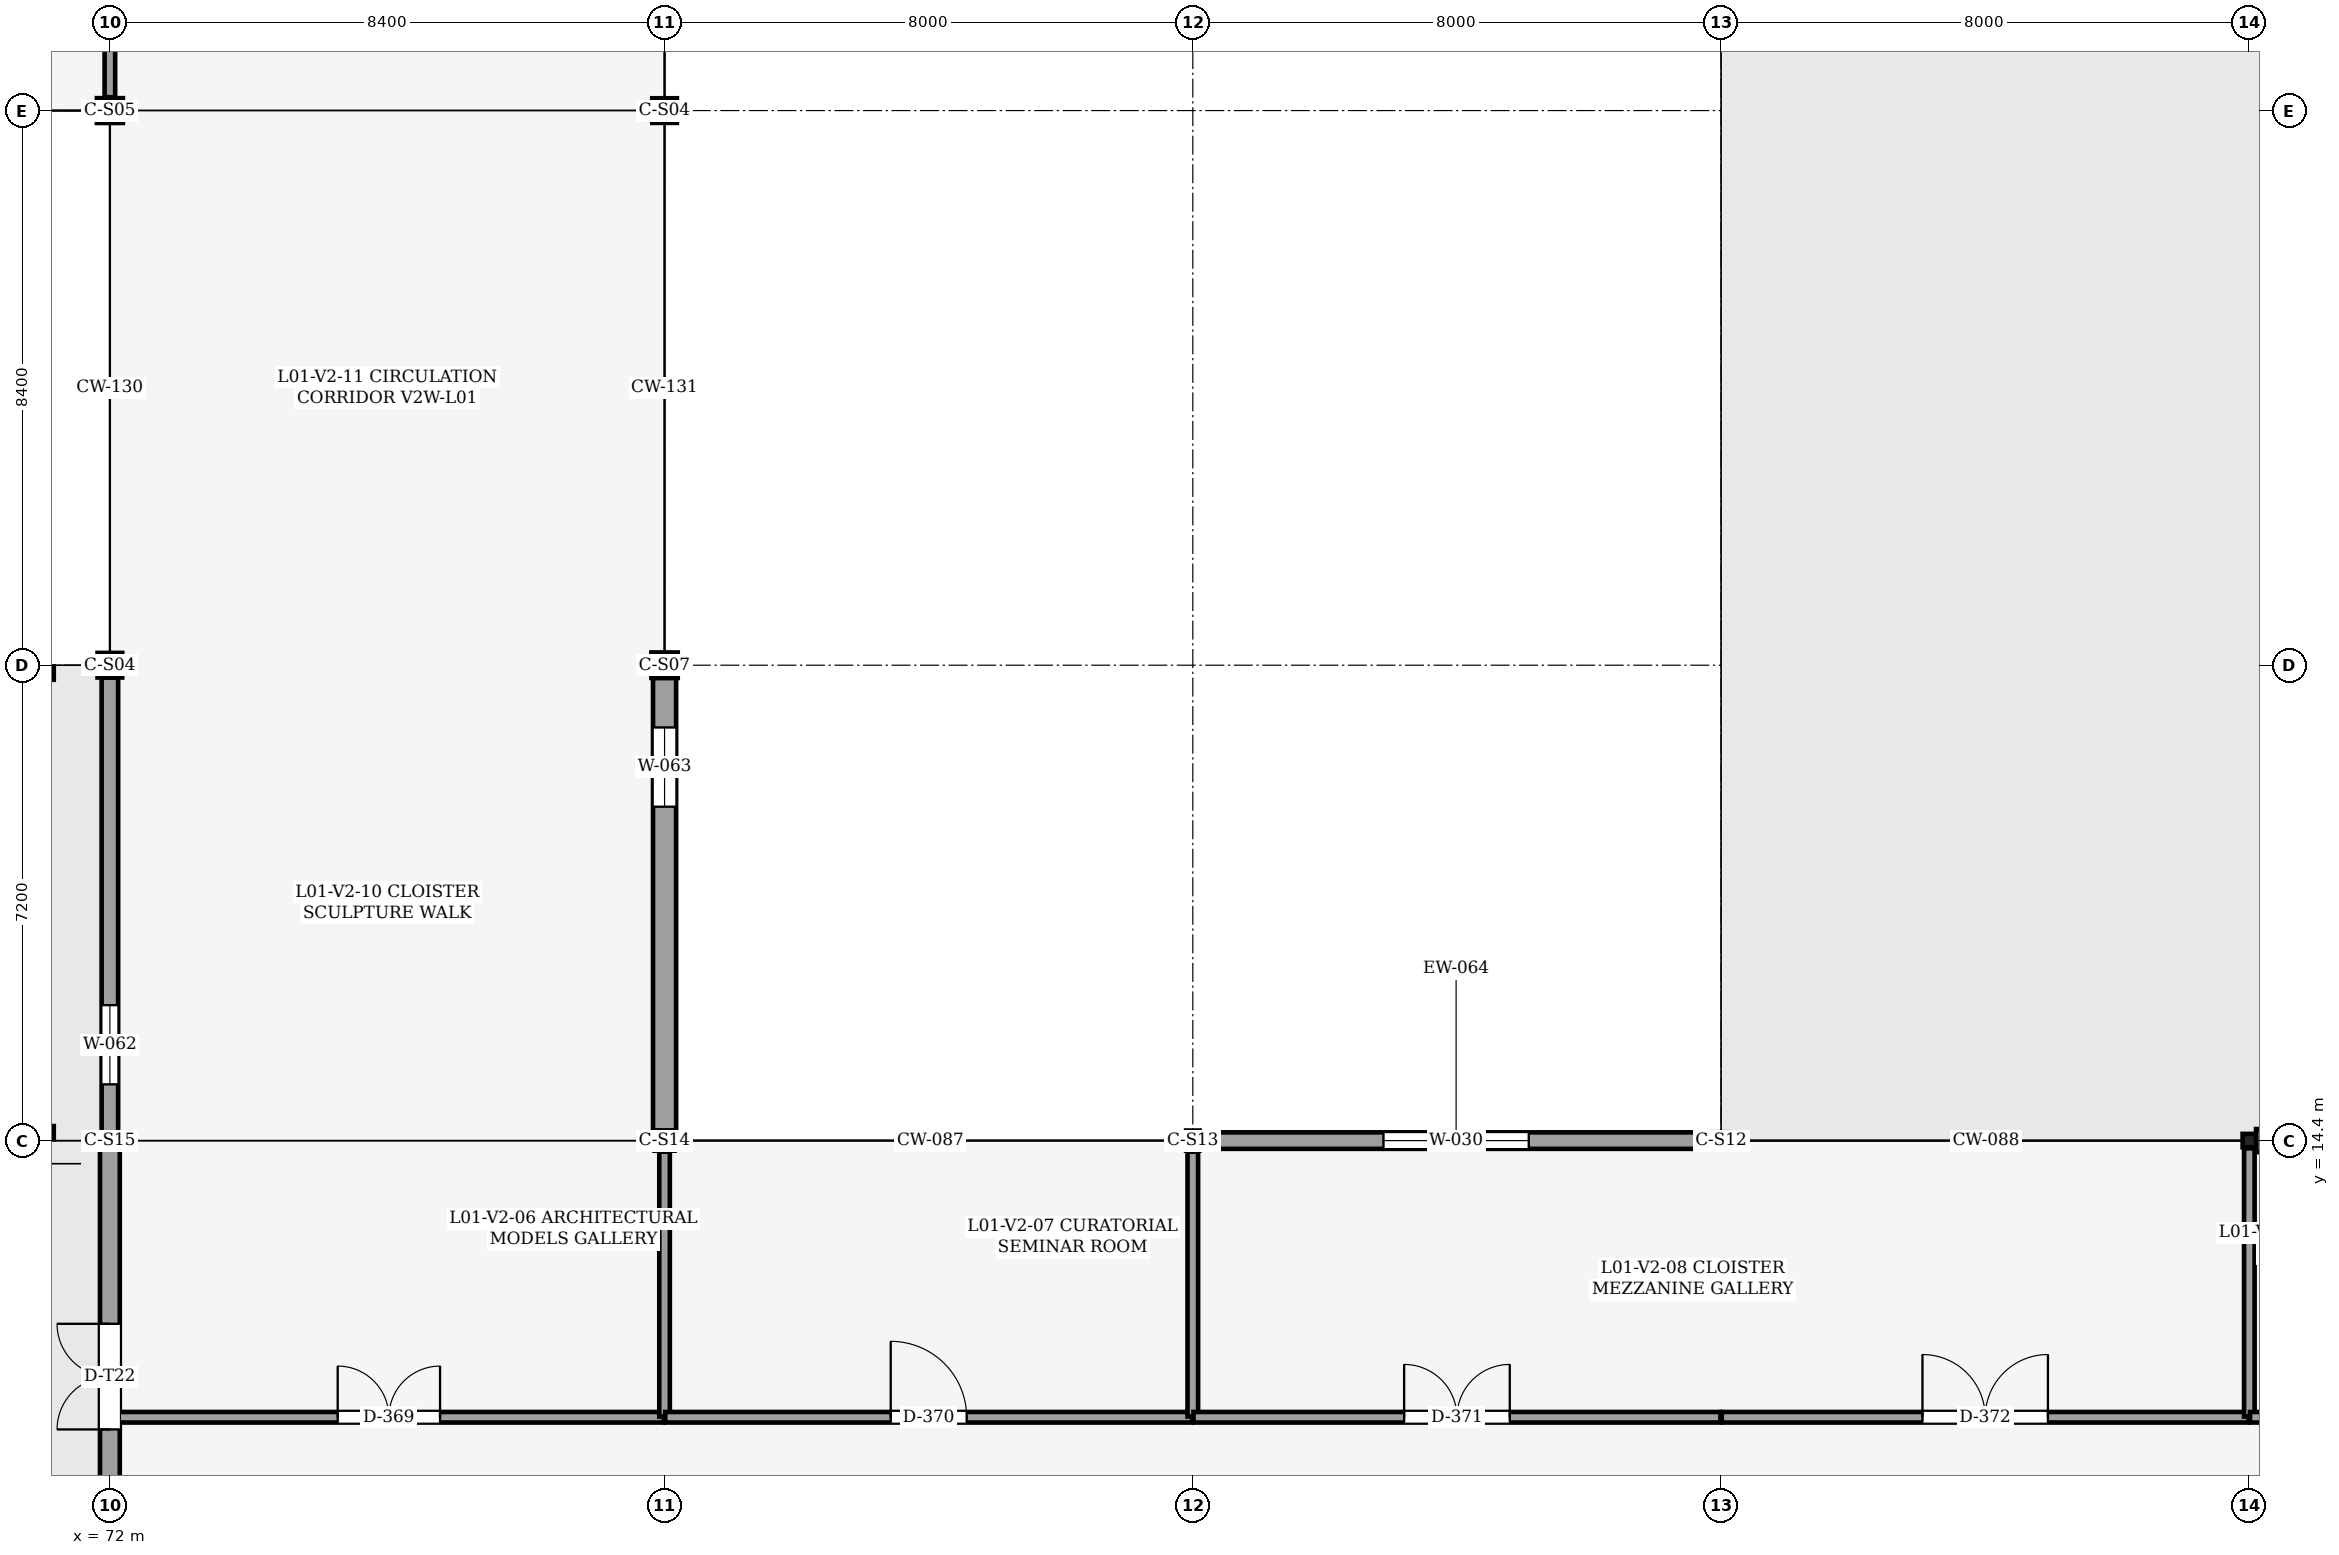
"""IFC4 building model, lengths in metres.
Left out: names, types, materials, properties, quantities, classifications, styles, units other than length and angle.
Written with IfcOpenShell. Run it as: python <this file> out.ifc"""

import sys

from ifc_helpers import new_model, si_unit, direction, frame, frame_2d, origin, origin_2d, place, context, subcontext, project, spatial, rectangle, hollow_rectangle, i_section, extrude, element, fill, save


model = new_model("IFC4")
c1 = context("Model", 3, precision=1e-05, world=origin(), true_north=direction((0.0, 1.0)))
c2 = subcontext(c1, "Body", "Model", "MODEL_VIEW")
j1 = project(units=[si_unit("LENGTHUNIT", "METRE"), si_unit("PLANEANGLEUNIT", "RADIAN")], contexts=[c1])
p1 = place(None, origin())
s1 = spatial("IfcSite", under=j1, at=p1, CompositionType="ELEMENT")
p2 = place(p1, origin())
s2 = spatial("IfcBuilding", under=s1, at=p2, CompositionType="ELEMENT")
p3 = place(p2, frame((0.0, 0.0, 5.4)))
s3 = spatial("IfcBuildingStorey", under=s2, at=p3, CompositionType="ELEMENT", Elevation=5.4)
p4 = place(p3, frame((72.0, 14.4, 0.0), z_axis=(0.0, 0.0, 1.0), x_axis=(1.0, 0.0, 0.0)))
e1 = element("IfcColumn", 1, at=p4, inside=s3, PredefinedType="COLUMN", context=c2, shape_type="SweptSolid", body=[
    extrude(hollow_rectangle(XDim=0.203, YDim=0.203, WallThickness=0.013, OuterFilletRadius=0.025, at=origin_2d()), origin(), (0.0, 0.0, 1.0), 4.8),
])
p5 = place(p3, frame((72.0, 21.6, 0.0), z_axis=(0.0, 0.0, 1.0), x_axis=(1.0, 0.0, 0.0)))
e2 = element("IfcColumn", 2, at=p5, inside=s3, PredefinedType="COLUMN", context=c2, shape_type="SweptSolid", body=[
    extrude(i_section(OverallWidth=0.373, OverallDepth=0.373, WebThickness=0.016, FlangeThickness=0.026, FilletRadius=0.025, at=origin_2d()), origin(), (0.0, 0.0, 1.0), 4.8),
])
p6 = place(p3, frame((72.0, 30.0, 0.0), z_axis=(0.0, 0.0, 1.0), x_axis=(1.0, 0.0, 0.0)))
e3 = element("IfcColumn", 3, at=p6, inside=s3, PredefinedType="COLUMN", context=c2, shape_type="SweptSolid", body=[
    extrude(i_section(OverallWidth=0.394, OverallDepth=0.376, WebThickness=0.017, FlangeThickness=0.028, FilletRadius=0.025, at=origin_2d()), origin(), (0.0, 0.0, 1.0), 4.8),
])
p7 = place(p3, frame((80.4, 14.4, 0.0), z_axis=(0.0, 0.0, 1.0), x_axis=(1.0, 0.0, 0.0)))
e4 = element("IfcColumn", 4, at=p7, inside=s3, PredefinedType="COLUMN", context=c2, shape_type="SweptSolid", body=[
    extrude(hollow_rectangle(XDim=0.305, YDim=0.305, WallThickness=0.016, OuterFilletRadius=0.032, at=origin_2d()), origin(), (0.0, 0.0, 1.0), 4.8),
])
p8 = place(p3, frame((80.4, 21.6, 0.0), z_axis=(0.0, 0.0, 1.0), x_axis=(1.0, 0.0, 0.0)))
e5 = element("IfcColumn", 5, at=p8, inside=s3, PredefinedType="COLUMN", context=c2, shape_type="SweptSolid", body=[
    extrude(i_section(OverallWidth=0.399, OverallDepth=0.386, WebThickness=0.021, FlangeThickness=0.033, FilletRadius=0.025, at=origin_2d()), origin(), (0.0, 0.0, 1.0), 4.8),
])
p9 = place(p3, frame((80.4, 30.0, 0.0), z_axis=(0.0, 0.0, 1.0), x_axis=(1.0, 0.0, 0.0)))
e6 = element("IfcColumn", 6, at=p9, inside=s3, PredefinedType="COLUMN", context=c2, shape_type="SweptSolid", body=[
    extrude(i_section(OverallWidth=0.373, OverallDepth=0.373, WebThickness=0.016, FlangeThickness=0.026, FilletRadius=0.025, at=origin_2d()), origin(), (0.0, 0.0, 1.0), 4.8),
])
p10 = place(p3, frame((88.4, 14.4, 0.0), z_axis=(0.0, 0.0, 1.0), x_axis=(1.0, 0.0, 0.0)))
e7 = element("IfcColumn", 7, at=p10, inside=s3, PredefinedType="COLUMN", context=c2, shape_type="SweptSolid", body=[
    extrude(hollow_rectangle(XDim=0.203, YDim=0.305, WallThickness=0.013, OuterFilletRadius=0.025, at=origin_2d()), origin(), (0.0, 0.0, 1.0), 4.8),
])
p11 = place(p3, frame((96.4, 14.4, 0.0), z_axis=(0.0, 0.0, 1.0), x_axis=(1.0, 0.0, 0.0)))
e8 = element("IfcColumn", 8, at=p11, inside=s3, PredefinedType="COLUMN", context=c2, shape_type="SweptSolid", body=[
    extrude(hollow_rectangle(XDim=0.254, YDim=0.254, WallThickness=0.013, OuterFilletRadius=0.025, at=origin_2d()), origin(), (0.0, 0.0, 1.0), 4.8),
])
p12 = place(p3, frame((104.4, 14.4, 0.0), z_axis=(0.0, 0.0, 1.0), x_axis=(1.0, 0.0, 0.0)))
e9 = element("IfcColumn", 9, at=p12, inside=s3, PredefinedType="COLUMN", context=c2, shape_type="SweptSolid", body=[
    extrude(hollow_rectangle(XDim=0.203, YDim=0.203, WallThickness=0.013, OuterFilletRadius=0.025, at=origin_2d()), origin(), (0.0, 0.0, 1.0), 4.8),
])
p13 = place(p3, frame((88.502, 14.4, 0.0), z_axis=(0.0, 0.0, 1.0), x_axis=(1.0, 0.0, 0.0)))
e10 = element("IfcWall", 10, at=p13, inside=s3, PredefinedType="SOLIDWALL", context=c2, shape_type="SweptSolid", body=[
    extrude(rectangle(XDim=7.771, YDim=0.25, at=frame_2d((3.886, 0.0))), origin(), (0.0, 0.0, 1.0), 3.913),
])
p14 = place(p13, frame((2.786, 0.0, 0.9)))
e11 = element("IfcOpeningElement", 11, at=p14, cuts=e10, PredefinedType="OPENING", context=c2, shape_type="SweptSolid", body=[
    extrude(rectangle(XDim=2.2, YDim=1.5, at=frame_2d((1.1, 0.75))), frame((0.0, 0.135, 0.0), z_axis=(0.0, -1.0, 0.0), x_axis=(1.0, 0.0, 0.0)), (0.0, 0.0, 1.0), 0.271),
])
p15 = place(p3, frame((104.502, 14.4, 0.0), z_axis=(0.0, 0.0, 1.0), x_axis=(1.0, 0.0, 0.0)))
e12 = element("IfcWall", 12, at=p15, inside=s3, PredefinedType="SOLIDWALL", context=c2, shape_type="SweptSolid", body=[
    extrude(rectangle(XDim=8.112, YDim=0.35, at=frame_2d((4.056, 0.0))), origin(), (0.0, 0.0, 1.0), 4.266),
])
p16 = place(p15, frame((2.856, 0.0, 0.9)))
e13 = element("IfcOpeningElement", 13, at=p16, cuts=e12, PredefinedType="OPENING", context=c2, shape_type="SweptSolid", body=[
    extrude(rectangle(XDim=2.4, YDim=1.5, at=frame_2d((1.2, 0.75))), frame((0.0, 0.185, 0.0), z_axis=(0.0, -1.0, 0.0), x_axis=(1.0, 0.0, 0.0)), (0.0, 0.0, 1.0), 0.371),
])
p17 = place(p3, frame((72.0, 7.352, 0.0), z_axis=(0.0, 0.0, 1.0), x_axis=(0.0, 1.0, 0.0)))
e14 = element("IfcWall", 14, at=p17, inside=s3, PredefinedType="SOLIDWALL", context=c2, shape_type="SweptSolid", body=[
    extrude(rectangle(XDim=6.946, YDim=0.3, at=frame_2d((3.473, 0.0))), origin(), (0.0, 0.0, 1.0), 3.913),
])
p18 = place(p17, frame((2.673, 0.0, 0.0)))
e15 = element("IfcOpeningElement", 15, at=p18, cuts=e14, PredefinedType="OPENING", context=c2, shape_type="SweptSolid", body=[
    extrude(rectangle(XDim=1.6, YDim=2.25, at=frame_2d((0.8, 1.125))), frame((0.0, 0.16, 0.0), z_axis=(0.0, -1.0, 0.0), x_axis=(1.0, 0.0, 0.0)), (0.0, 0.0, 1.0), 0.321),
])
p19 = place(p3, frame((72.0, 14.502, 0.0), z_axis=(0.0, 0.0, 1.0), x_axis=(0.0, 1.0, 0.0)))
e16 = element("IfcWall", 16, at=p19, inside=s3, PredefinedType="SOLIDWALL", context=c2, shape_type="SweptSolid", body=[
    extrude(rectangle(XDim=6.912, YDim=0.25, at=frame_2d((3.456, 0.0))), origin(), (0.0, 0.0, 1.0), 3.987),
])
p20 = place(p19, frame((0.75, 0.0, 0.9)))
e17 = element("IfcOpeningElement", 17, at=p20, cuts=e16, PredefinedType="OPENING", context=c2, shape_type="SweptSolid", body=[
    extrude(rectangle(XDim=1.2, YDim=1.5, at=frame_2d((0.6, 0.75))), frame((0.0, 0.135, 0.0), z_axis=(0.0, -1.0, 0.0), x_axis=(1.0, 0.0, 0.0)), (0.0, 0.0, 1.0), 0.271),
])
p21 = place(p3, frame((80.4, 21.407, 0.0), z_axis=(0.0, 0.0, 1.0), x_axis=(0.0, -1.0, 0.0)))
e18 = element("IfcWall", 18, at=p21, inside=s3, PredefinedType="SOLIDWALL", context=c2, shape_type="SweptSolid", body=[
    extrude(rectangle(XDim=6.854, YDim=0.35, at=frame_2d((3.427, 0.0))), origin(), (0.0, 0.0, 1.0), 4.058),
])
p22 = place(p21, frame((0.75, 0.0, 0.9)))
e19 = element("IfcOpeningElement", 19, at=p22, cuts=e18, PredefinedType="OPENING", context=c2, shape_type="SweptSolid", body=[
    extrude(rectangle(XDim=1.2, YDim=1.5, at=frame_2d((0.6, 0.75))), frame((0.0, 0.185, 0.0), z_axis=(0.0, -1.0, 0.0), x_axis=(1.0, 0.0, 0.0)), (0.0, 0.0, 1.0), 0.371),
])
for number, where, z_axis, x_axis in (
    (20, (64.45, 14.52, 0.0), (0.0, 0.0, 1.0), (1.0, 0.0, 0.0)),
    (21, (64.45, 21.48, 0.0), (0.0, 0.0, 1.0), (1.0, 0.0, 0.0)),
):
    element("IfcWall", number, at=place(p3, frame(where, z_axis=z_axis, x_axis=x_axis)), inside=s3, PredefinedType="PARAPET", context=c2, shape_type="SweptSolid", body=[
        extrude(rectangle(XDim=6.7, YDim=0.2, at=frame_2d((3.35, 0.0))), origin(), (0.0, 0.0, 1.0), 0.95),
    ])
p23 = place(p3, frame((72.0, 30.203, 0.0), z_axis=(0.0, 0.0, 1.0), x_axis=(0.0, 1.0, 0.0)))
e22 = element("IfcWall", 22, at=p23, inside=s3, PredefinedType="PARTITIONING", context=c2, shape_type="SweptSolid", body=[
    extrude(rectangle(XDim=5.177, YDim=0.16, at=frame_2d((2.588, 0.0))), origin(), (0.0, 0.0, 1.0), 3.748),
])
p24 = place(p3, frame((72.06, 10.21, 0.0), z_axis=(0.0, 0.0, 1.0), x_axis=(1.0, 0.0, 0.0)))
e23 = element("IfcWall", 23, at=p24, inside=s3, PredefinedType="PARTITIONING", context=c2, shape_type="SweptSolid", body=[
    extrude(rectangle(XDim=8.33, YDim=0.16, at=frame_2d((4.165, 0.0))), origin(), (0.0, 0.0, 1.0), 4.52),
])
p25 = place(p24, frame((3.39, 0.0, 0.0)))
e24 = element("IfcOpeningElement", 24, at=p25, cuts=e23, PredefinedType="OPENING", context=c2, shape_type="SweptSolid", body=[
    extrude(rectangle(XDim=1.55, YDim=2.3, at=frame_2d((0.775, 1.15))), frame((0.0, 0.09, 0.0), z_axis=(0.0, -1.0, 0.0), x_axis=(1.0, 0.0, 0.0)), (0.0, 0.0, 1.0), 0.18),
])
p26 = place(p3, frame((80.4, 10.22, 0.0), z_axis=(0.0, 0.0, 1.0), x_axis=(0.0, 1.0, 0.0)))
e25 = element("IfcWall", 25, at=p26, inside=s3, PredefinedType="PARTITIONING", context=c2, shape_type="SweptSolid", body=[
    extrude(rectangle(XDim=4.013, YDim=0.16, at=frame_2d((2.006, 0.0))), origin(), (0.0, 0.0, 1.0), 3.987),
])
p27 = place(p3, frame((80.41, 10.21, 0.0), z_axis=(0.0, 0.0, 1.0), x_axis=(1.0, 0.0, 0.0)))
e26 = element("IfcWall", 26, at=p27, inside=s3, PredefinedType="PARTITIONING", context=c2, shape_type="SweptSolid", body=[
    extrude(rectangle(XDim=7.98, YDim=0.16, at=frame_2d((3.99, 0.0))), origin(), (0.0, 0.0, 1.0), 4.52),
])
p28 = place(p27, frame((3.415, 0.0, 0.0)))
e27 = element("IfcOpeningElement", 27, at=p28, cuts=e26, PredefinedType="OPENING", context=c2, shape_type="SweptSolid", body=[
    extrude(rectangle(XDim=1.15, YDim=2.2, at=frame_2d((0.575, 1.1))), frame((0.0, 0.09, 0.0), z_axis=(0.0, -1.0, 0.0), x_axis=(1.0, 0.0, 0.0)), (0.0, 0.0, 1.0), 0.18),
])
p29 = place(p3, frame((88.4, 10.22, 0.0), z_axis=(0.0, 0.0, 1.0), x_axis=(0.0, 1.0, 0.0)))
e28 = element("IfcWall", 28, at=p29, inside=s3, PredefinedType="PARTITIONING", context=c2, shape_type="SweptSolid", body=[
    extrude(rectangle(XDim=4.013, YDim=0.16, at=frame_2d((2.006, 0.0))), origin(), (0.0, 0.0, 1.0), 4.058),
])
p30 = place(p3, frame((88.41, 10.21, 0.0), z_axis=(0.0, 0.0, 1.0), x_axis=(1.0, 0.0, 0.0)))
e29 = element("IfcWall", 29, at=p30, inside=s3, PredefinedType="PARTITIONING", context=c2, shape_type="SweptSolid", body=[
    extrude(rectangle(XDim=7.98, YDim=0.16, at=frame_2d((3.99, 0.0))), origin(), (0.0, 0.0, 1.0), 4.52),
])
p31 = place(p30, frame((3.19, 0.0, 0.0)))
e30 = element("IfcOpeningElement", 30, at=p31, cuts=e29, PredefinedType="OPENING", context=c2, shape_type="SweptSolid", body=[
    extrude(rectangle(XDim=1.6, YDim=2.35, at=frame_2d((0.8, 1.175))), frame((0.0, 0.09, 0.0), z_axis=(0.0, -1.0, 0.0), x_axis=(1.0, 0.0, 0.0)), (0.0, 0.0, 1.0), 0.18),
])
p32 = place(p3, frame((96.41, 10.21, 0.0), z_axis=(0.0, 0.0, 1.0), x_axis=(1.0, 0.0, 0.0)))
e31 = element("IfcWall", 31, at=p32, inside=s3, PredefinedType="PARTITIONING", context=c2, shape_type="SweptSolid", body=[
    extrude(rectangle(XDim=7.98, YDim=0.16, at=frame_2d((3.99, 0.0))), origin(), (0.0, 0.0, 1.0), 4.52),
])
p33 = place(p32, frame((3.04, 0.0, 0.0)))
e32 = element("IfcOpeningElement", 32, at=p33, cuts=e31, PredefinedType="OPENING", context=c2, shape_type="SweptSolid", body=[
    extrude(rectangle(XDim=1.9, YDim=2.45, at=frame_2d((0.95, 1.225))), frame((0.0, 0.09, 0.0), z_axis=(0.0, -1.0, 0.0), x_axis=(1.0, 0.0, 0.0)), (0.0, 0.0, 1.0), 0.18),
])
p34 = place(p3, frame((104.4, 10.22, 0.0), z_axis=(0.0, 0.0, 1.0), x_axis=(0.0, 1.0, 0.0)))
e33 = element("IfcWall", 33, at=p34, inside=s3, PredefinedType="PARTITIONING", context=c2, shape_type="SweptSolid", body=[
    extrude(rectangle(XDim=4.063, YDim=0.16, at=frame_2d((2.032, 0.0))), origin(), (0.0, 0.0, 1.0), 3.913),
])
p35 = place(p3, frame((104.41, 10.21, 0.0), z_axis=(0.0, 0.0, 1.0), x_axis=(1.0, 0.0, 0.0)))
e34 = element("IfcWall", 34, at=p35, inside=s3, PredefinedType="PARTITIONING", context=c2, shape_type="SweptSolid", body=[
    extrude(rectangle(XDim=8.33, YDim=0.16, at=frame_2d((4.165, 0.0))), origin(), (0.0, 0.0, 1.0), 4.52),
])
p36 = place(p35, frame((3.39, 0.0, 0.0)))
e35 = element("IfcOpeningElement", 35, at=p36, cuts=e34, PredefinedType="OPENING", context=c2, shape_type="SweptSolid", body=[
    extrude(rectangle(XDim=1.55, YDim=2.3, at=frame_2d((0.775, 1.15))), frame((0.0, 0.09, 0.0), z_axis=(0.0, -1.0, 0.0), x_axis=(1.0, 0.0, 0.0)), (0.0, 0.0, 1.0), 0.18),
])
p37 = place(p14, origin())
e36 = element("IfcWindow", 36, at=p37, inside=s3, PartitioningType="SINGLE_PANEL", PredefinedType="WINDOW", context=c2, shape_type="SweptSolid", body=[
    extrude(rectangle(XDim=2.2, YDim=1.5, at=frame_2d((1.1, 0.75))), frame((0.0, 0.03, 0.0), z_axis=(0.0, -1.0, 0.0), x_axis=(1.0, 0.0, 0.0)), (0.0, 0.0, 1.0), 0.06),
])
fill(e11, e36)
p38 = place(p18, origin())
e37 = element("IfcDoor", 37, at=p38, inside=s3, OperationType="DOUBLE_DOOR_SINGLE_SWING", PredefinedType="DOOR", context=c2, shape_type="SweptSolid", body=[
    extrude(rectangle(XDim=1.6, YDim=2.25, at=frame_2d((0.8, 1.125))), frame((0.0, 0.025, 0.0), z_axis=(0.0, -1.0, 0.0), x_axis=(1.0, 0.0, 0.0)), (0.0, 0.0, 1.0), 0.05),
])
fill(e15, e37)
p39 = place(p20, origin())
e38 = element("IfcWindow", 38, at=p39, inside=s3, PartitioningType="SINGLE_PANEL", PredefinedType="WINDOW", context=c2, shape_type="SweptSolid", body=[
    extrude(rectangle(XDim=1.2, YDim=1.5, at=frame_2d((0.6, 0.75))), frame((0.0, 0.03, 0.0), z_axis=(0.0, -1.0, 0.0), x_axis=(1.0, 0.0, 0.0)), (0.0, 0.0, 1.0), 0.06),
])
fill(e17, e38)
p40 = place(p22, origin())
e39 = element("IfcWindow", 39, at=p40, inside=s3, PartitioningType="SINGLE_PANEL", PredefinedType="WINDOW", context=c2, shape_type="SweptSolid", body=[
    extrude(rectangle(XDim=1.2, YDim=1.5, at=frame_2d((0.6, 0.75))), frame((0.0, 0.03, 0.0), z_axis=(0.0, -1.0, 0.0), x_axis=(1.0, 0.0, 0.0)), (0.0, 0.0, 1.0), 0.06),
])
fill(e19, e39)
p41 = place(p25, origin())
e40 = element("IfcDoor", 40, at=p41, inside=s3, OperationType="DOUBLE_DOOR_SINGLE_SWING", PredefinedType="DOOR", context=c2, shape_type="SweptSolid", body=[
    extrude(rectangle(XDim=1.55, YDim=2.3, at=frame_2d((0.775, 1.15))), frame((0.0, 0.025, 0.0), z_axis=(0.0, -1.0, 0.0), x_axis=(1.0, 0.0, 0.0)), (0.0, 0.0, 1.0), 0.05),
])
fill(e24, e40)
p42 = place(p28, origin())
e41 = element("IfcDoor", 41, at=p42, inside=s3, OperationType="SINGLE_SWING_LEFT", PredefinedType="DOOR", context=c2, shape_type="SweptSolid", body=[
    extrude(rectangle(XDim=1.15, YDim=2.2, at=frame_2d((0.575, 1.1))), frame((0.0, 0.025, 0.0), z_axis=(0.0, -1.0, 0.0), x_axis=(1.0, 0.0, 0.0)), (0.0, 0.0, 1.0), 0.05),
])
fill(e27, e41)
p43 = place(p31, origin())
e42 = element("IfcDoor", 42, at=p43, inside=s3, OperationType="DOUBLE_DOOR_SINGLE_SWING", PredefinedType="DOOR", context=c2, shape_type="SweptSolid", body=[
    extrude(rectangle(XDim=1.6, YDim=2.35, at=frame_2d((0.8, 1.175))), frame((0.0, 0.025, 0.0), z_axis=(0.0, -1.0, 0.0), x_axis=(1.0, 0.0, 0.0)), (0.0, 0.0, 1.0), 0.05),
])
fill(e30, e42)
p44 = place(p33, origin())
e43 = element("IfcDoor", 43, at=p44, inside=s3, OperationType="DOUBLE_DOOR_SINGLE_SWING", PredefinedType="DOOR", context=c2, shape_type="SweptSolid", body=[
    extrude(rectangle(XDim=1.9, YDim=2.45, at=frame_2d((0.95, 1.225))), frame((0.0, 0.025, 0.0), z_axis=(0.0, -1.0, 0.0), x_axis=(1.0, 0.0, 0.0)), (0.0, 0.0, 1.0), 0.05),
])
fill(e32, e43)
save(model, sys.argv[1])
